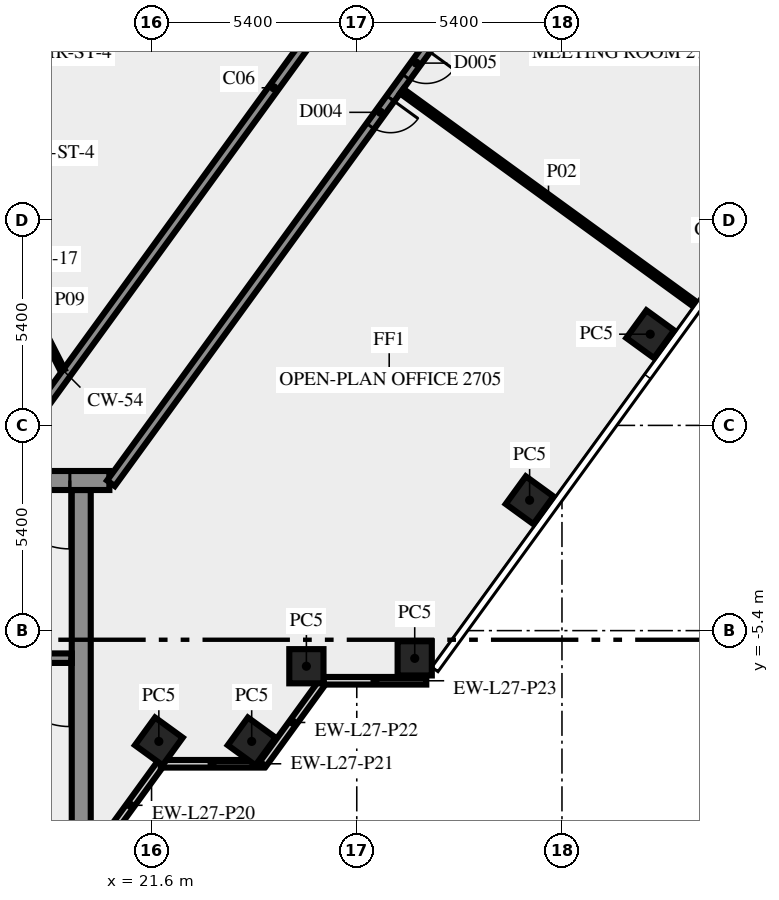
"""IFC4 building model, lengths in metres.
Left out: names, types, materials, properties, quantities, classifications, styles, units other than length and angle.
Written with IfcOpenShell. Run it as: python <this file> out.ifc"""

import sys

from ifc_helpers import new_model, si_unit, direction, frame, frame_2d, origin, origin_2d, place, context, subcontext, project, spatial, rectangle, extrude, element, fill, save


model = new_model("IFC4")
c1 = context("Model", 3, precision=1e-05, world=origin(), true_north=direction((0.0, 1.0)))
c2 = subcontext(c1, "Body", "Model", "MODEL_VIEW")
j1 = project(units=[si_unit("LENGTHUNIT", "METRE"), si_unit("PLANEANGLEUNIT", "RADIAN")], contexts=[c1])
p1 = place(None, origin())
s1 = spatial("IfcSite", under=j1, at=p1, CompositionType="ELEMENT")
p2 = place(p1, origin())
s2 = spatial("IfcBuilding", under=s1, at=p2, CompositionType="ELEMENT")
p3 = place(p2, frame((0.0, 0.0, 117.0)))
s3 = spatial("IfcBuildingStorey", under=s2, at=p3, CompositionType="ELEMENT", Elevation=117.0)
for number, where, z_axis, x_axis in (
    (1, (21.792, -8.315, 0.0), (0.0, 0.0, 1.0), (0.588, 0.809, 0.0)),
    (2, (24.235, -8.315, 0.0), (0.0, 0.0, 1.0), (0.588, 0.809, 0.0)),
    (3, (25.674, -6.337, 0.0), (0.0, 0.0, 1.0), (1.0, 0.0, 0.0)),
    (4, (28.525, -6.13, 0.0), (0.0, 0.0, 1.0), (1.0, 0.0, 0.0)),
    (5, (31.548, -1.969, 0.0), (0.0, 0.0, 1.0), (0.588, 0.809, 0.0)),
    (6, (34.722, 2.4, 0.0), (0.0, 0.0, 1.0), (0.588, 0.809, 0.0)),
):
    element("IfcColumn", number, at=place(p3, frame(where, z_axis=z_axis, x_axis=x_axis)), inside=s3, PredefinedType="COLUMN", context=c2, shape_type="SweptSolid", body=[
        extrude(rectangle(XDim=0.9, YDim=0.9, at=origin_2d()), origin(), (0.0, 0.0, 1.0), 3.65),
    ])
p4 = place(p3, frame((20.253, -11.083, 0.0), z_axis=(0.0, 0.0, 1.0), x_axis=(0.587766567315, 0.809030569476, 0.0)))
e7 = element("IfcWall", 7, at=p4, inside=s3, PredefinedType="SOLIDWALL", context=c2, shape_type="SweptSolid", body=[
    extrude(rectangle(XDim=2.688, YDim=0.2, at=frame_2d((1.344, 0.0))), origin(), (0.0, 0.0, 1.0), 3.65),
])
p5 = place(p3, frame((21.843, -8.904, 0.0), z_axis=(0.0, 0.0, 1.0), x_axis=(1.0, 0.0, 0.0)))
e8 = element("IfcWall", 8, at=p5, inside=s3, PredefinedType="SOLIDWALL", context=c2, shape_type="SweptSolid", body=[
    extrude(rectangle(XDim=2.7, YDim=0.2, at=frame_2d((1.35, 0.0))), origin(), (0.0, 0.0, 1.0), 3.65),
])
p6 = place(p3, frame((24.533, -8.909, 0.0), z_axis=(0.0, 0.0, 1.0), x_axis=(0.587720002413, 0.809064397168, 0.0)))
e9 = element("IfcWall", 9, at=p6, inside=s3, PredefinedType="SOLIDWALL", context=c2, shape_type="SweptSolid", body=[
    extrude(rectangle(XDim=2.7, YDim=0.2, at=frame_2d((1.35, 0.0))), origin(), (0.0, 0.0, 1.0), 3.65),
])
p7 = place(p3, frame((26.13, -6.719, 0.0), z_axis=(0.0, 0.0, 1.0), x_axis=(1.0, 0.0, 0.0)))
e10 = element("IfcWall", 10, at=p7, inside=s3, PredefinedType="SOLIDWALL", context=c2, shape_type="SweptSolid", body=[
    extrude(rectangle(XDim=2.7, YDim=0.2, at=frame_2d((1.35, 0.0))), origin(), (0.0, 0.0, 1.0), 3.65),
])
p8 = place(p3, frame((19.75, -10.5, 0.0), z_axis=(0.0, 0.0, 1.0), x_axis=(0.0, 1.0, 0.0)))
e11 = element("IfcWall", 11, at=p8, inside=s3, PredefinedType="SHEAR", context=c2, shape_type="SweptSolid", body=[
    extrude(rectangle(XDim=8.8, YDim=0.5, at=frame_2d((4.4, 0.0))), origin(), (0.0, 0.0, 1.0), 3.65),
])
p9 = place(p3, frame((19.5, -6.125, 0.0), z_axis=(0.0, 0.0, 1.0), x_axis=(-1.0, 0.0, 0.0)))
e12 = element("IfcWall", 12, at=p9, inside=s3, PredefinedType="SHEAR", context=c2, shape_type="SweptSolid", body=[
    extrude(rectangle(XDim=8.05, YDim=0.25, at=frame_2d((4.025, 0.0))), origin(), (0.0, 0.0, 1.0), 3.65),
])
p10 = place(p9, frame((0.05, 0.0, 0.0)))
e13 = element("IfcOpeningElement", 13, at=p10, cuts=e12, PredefinedType="OPENING", context=c2, shape_type="SweptSolid", body=[
    extrude(rectangle(XDim=1.8, YDim=2.1, at=frame_2d((0.9, 1.05))), frame((0.0, 0.135, 0.0), z_axis=(0.0, -1.0, 0.0), x_axis=(1.0, 0.0, 0.0)), (0.0, 0.0, 1.0), 0.27),
])
p11 = place(p3, frame((20.49, -1.45, 0.0), z_axis=(0.0, 0.0, 1.0), x_axis=(-1.0, 0.0, 0.0)))
e14 = element("IfcWall", 14, at=p11, inside=s3, PredefinedType="SHEAR", context=c2, shape_type="SweptSolid", body=[
    extrude(rectangle(XDim=40.98, YDim=0.5, at=frame_2d((20.49, 0.0))), origin(), (0.0, 0.0, 1.0), 3.65),
])
p12 = place(p11, frame((38.14, 0.0, 0.0)))
e15 = element("IfcOpeningElement", 15, at=p12, cuts=e14, PredefinedType="OPENING", context=c2, shape_type="SweptSolid", body=[
    extrude(rectangle(XDim=1.8, YDim=2.1, at=frame_2d((0.9, 1.05))), frame((0.0, 0.26, 0.0), z_axis=(0.0, -1.0, 0.0), x_axis=(1.0, 0.0, 0.0)), (0.0, 0.0, 1.0), 0.52),
])
p13 = place(p11, frame((36.728, 0.0, 0.0)))
e16 = element("IfcOpeningElement", 16, at=p13, cuts=e14, PredefinedType="OPENING", context=c2, shape_type="SweptSolid", body=[
    extrude(rectangle(XDim=0.8, YDim=2.1, at=frame_2d((0.4, 1.05))), frame((0.0, 0.26, 0.0), z_axis=(0.0, -1.0, 0.0), x_axis=(1.0, 0.0, 0.0)), (0.0, 0.0, 1.0), 0.52),
])
p14 = place(p11, frame((35.153, 0.0, 0.0)))
e17 = element("IfcOpeningElement", 17, at=p14, cuts=e14, PredefinedType="OPENING", context=c2, shape_type="SweptSolid", body=[
    extrude(rectangle(XDim=0.8, YDim=2.1, at=frame_2d((0.4, 1.05))), frame((0.0, 0.26, 0.0), z_axis=(0.0, -1.0, 0.0), x_axis=(1.0, 0.0, 0.0)), (0.0, 0.0, 1.0), 0.52),
])
p15 = place(p11, frame((32.94, 0.0, 0.0)))
e18 = element("IfcOpeningElement", 18, at=p15, cuts=e14, PredefinedType="OPENING", context=c2, shape_type="SweptSolid", body=[
    extrude(rectangle(XDim=0.9, YDim=2.1, at=frame_2d((0.45, 1.05))), frame((0.0, 0.26, 0.0), z_axis=(0.0, -1.0, 0.0), x_axis=(1.0, 0.0, 0.0)), (0.0, 0.0, 1.0), 0.52),
])
p16 = place(p11, frame((21.765, 0.0, 0.0)))
e19 = element("IfcOpeningElement", 19, at=p16, cuts=e14, PredefinedType="OPENING", context=c2, shape_type="SweptSolid", body=[
    extrude(rectangle(XDim=2.0, YDim=2.1, at=frame_2d((1.0, 1.05))), frame((0.0, 0.26, 0.0), z_axis=(0.0, -1.0, 0.0), x_axis=(1.0, 0.0, 0.0)), (0.0, 0.0, 1.0), 0.52),
])
p17 = place(p11, frame((7.14, 0.0, 0.0)))
e20 = element("IfcOpeningElement", 20, at=p17, cuts=e14, PredefinedType="OPENING", context=c2, shape_type="SweptSolid", body=[
    extrude(rectangle(XDim=0.9, YDim=2.1, at=frame_2d((0.45, 1.05))), frame((0.0, 0.26, 0.0), z_axis=(0.0, -1.0, 0.0), x_axis=(1.0, 0.0, 0.0)), (0.0, 0.0, 1.0), 0.52),
])
p18 = place(p11, frame((4.19, 0.0, 0.0)))
e21 = element("IfcOpeningElement", 21, at=p18, cuts=e14, PredefinedType="OPENING", context=c2, shape_type="SweptSolid", body=[
    extrude(rectangle(XDim=0.9, YDim=2.1, at=frame_2d((0.45, 1.05))), frame((0.0, 0.26, 0.0), z_axis=(0.0, -1.0, 0.0), x_axis=(1.0, 0.0, 0.0)), (0.0, 0.0, 1.0), 0.52),
])
p19 = place(p11, frame((1.04, 0.0, 0.0)))
e22 = element("IfcOpeningElement", 22, at=p19, cuts=e14, PredefinedType="OPENING", context=c2, shape_type="SweptSolid", body=[
    extrude(rectangle(XDim=1.8, YDim=2.1, at=frame_2d((0.9, 1.05))), frame((0.0, 0.26, 0.0), z_axis=(0.0, -1.0, 0.0), x_axis=(1.0, 0.0, 0.0)), (0.0, 0.0, 1.0), 0.52),
])
p20 = place(p3, frame((40.463, 25.911, 0.0), z_axis=(0.0, 0.0, 1.0), x_axis=(-0.587781654618, -0.809019608226, 0.0)))
e23 = element("IfcWall", 23, at=p20, inside=s3, PredefinedType="SOLIDWALL", context=c2, shape_type="SweptSolid", body=[
    extrude(rectangle(XDim=33.911, YDim=0.25, at=frame_2d((16.956, 0.0))), origin(), (0.0, 0.0, 1.0), 3.65),
])
p21 = place(p20, frame((21.396, 0.0, 0.0)))
e24 = element("IfcOpeningElement", 24, at=p21, cuts=e23, PredefinedType="OPENING", context=c2, shape_type="SweptSolid", body=[
    extrude(rectangle(XDim=0.9, YDim=2.1, at=frame_2d((0.45, 1.05))), frame((0.0, 0.135, 0.0), z_axis=(0.0, -1.0, 0.0), x_axis=(1.0, 0.0, 0.0)), (0.0, 0.0, 1.0), 0.27),
])
p22 = place(p20, frame((19.795, 0.0, 0.0)))
e25 = element("IfcOpeningElement", 25, at=p22, cuts=e23, PredefinedType="OPENING", context=c2, shape_type="SweptSolid", body=[
    extrude(rectangle(XDim=0.9, YDim=2.1, at=frame_2d((0.45, 1.05))), frame((0.0, 0.135, 0.0), z_axis=(0.0, -1.0, 0.0), x_axis=(1.0, 0.0, 0.0)), (0.0, 0.0, 1.0), 0.27),
])
p23 = place(p3, frame((17.545, -1.125, 0.0), z_axis=(0.0, 0.0, 1.0), x_axis=(0.587788021768, 0.809014982226, 0.0)))
e26 = element("IfcWall", 26, at=p23, inside=s3, PredefinedType="SOLIDWALL", context=c2, shape_type="SweptSolid", body=[
    extrude(rectangle(XDim=35.344, YDim=0.25, at=frame_2d((17.672, 0.0))), origin(), (0.0, 0.0, 1.0), 3.65),
])
p24 = place(p23, frame((17.508, 0.0, 0.0)))
e27 = element("IfcOpeningElement", 27, at=p24, cuts=e26, PredefinedType="OPENING", context=c2, shape_type="SweptSolid", body=[
    extrude(rectangle(XDim=0.9, YDim=2.1, at=frame_2d((0.45, 1.05))), frame((0.0, 0.135, 0.0), z_axis=(0.0, -1.0, 0.0), x_axis=(1.0, 0.0, 0.0)), (0.0, 0.0, 1.0), 0.27),
])
p25 = place(p23, frame((21.808, 0.0, 0.0)))
e28 = element("IfcOpeningElement", 28, at=p25, cuts=e26, PredefinedType="OPENING", context=c2, shape_type="SweptSolid", body=[
    extrude(rectangle(XDim=0.9, YDim=2.1, at=frame_2d((0.45, 1.05))), frame((0.0, 0.135, 0.0), z_axis=(0.0, -1.0, 0.0), x_axis=(1.0, 0.0, 0.0)), (0.0, 0.0, 1.0), 0.27),
])
p26 = place(p23, frame((19.108, 0.0, 0.0)))
e29 = element("IfcOpeningElement", 29, at=p26, cuts=e26, PredefinedType="OPENING", context=c2, shape_type="SweptSolid", body=[
    extrude(rectangle(XDim=0.9, YDim=2.1, at=frame_2d((0.45, 1.05))), frame((0.0, 0.135, 0.0), z_axis=(0.0, -1.0, 0.0), x_axis=(1.0, 0.0, 0.0)), (0.0, 0.0, 1.0), 0.27),
])
p27 = place(p3, frame((35.909, 3.183, 0.0), z_axis=(0.0, 0.0, 1.0), x_axis=(-0.809045492695, 0.587746025721, 0.0)))
e30 = element("IfcWall", 30, at=p27, inside=s3, PredefinedType="PARTITIONING", context=c2, shape_type="SweptSolid", body=[
    extrude(rectangle(XDim=9.551, YDim=0.15, at=frame_2d((4.775, 0.0))), origin(), (0.0, 0.0, 1.0), 2.75),
])
p28 = place(p3, frame((18.0, 3.925, 0.0), z_axis=(0.0, 0.0, 1.0), x_axis=(0.453950796792, -0.891026752736, 0.0)))
e31 = element("IfcWall", 31, at=p28, inside=s3, PredefinedType="PARTITIONING", context=c2, shape_type="SweptSolid", body=[
    extrude(rectangle(XDim=2.778, YDim=0.12, at=frame_2d((1.389, 0.0))), origin(), (0.0, 0.0, 1.0), 3.65),
])
p29 = place(p10, origin())
e32 = element("IfcDoor", 32, at=p29, inside=s3, OperationType="DOUBLE_DOOR_SINGLE_SWING", PredefinedType="DOOR", context=c2, shape_type="SweptSolid", body=[
    extrude(rectangle(XDim=1.8, YDim=2.1, at=frame_2d((0.9, 1.05))), frame((0.0, 0.025, 0.0), z_axis=(0.0, -1.0, 0.0), x_axis=(1.0, 0.0, 0.0)), (0.0, 0.0, 1.0), 0.05),
])
fill(e13, e32)
p30 = place(p19, origin())
e33 = element("IfcDoor", 33, at=p30, inside=s3, OperationType="DOUBLE_DOOR_SINGLE_SWING", PredefinedType="DOOR", context=c2, shape_type="SweptSolid", body=[
    extrude(rectangle(XDim=1.8, YDim=2.1, at=frame_2d((0.9, 1.05))), frame((0.0, 0.025, 0.0), z_axis=(0.0, -1.0, 0.0), x_axis=(1.0, 0.0, 0.0)), (0.0, 0.0, 1.0), 0.05),
])
fill(e22, e33)
p31 = place(p21, origin())
e34 = element("IfcDoor", 34, at=p31, inside=s3, OperationType="SINGLE_SWING_LEFT", PredefinedType="DOOR", context=c2, shape_type="SweptSolid", body=[
    extrude(rectangle(XDim=0.9, YDim=2.1, at=frame_2d((0.45, 1.05))), frame((0.0, 0.025, 0.0), z_axis=(0.0, -1.0, 0.0), x_axis=(1.0, 0.0, 0.0)), (0.0, 0.0, 1.0), 0.05),
])
fill(e24, e34)
p32 = place(p22, origin())
e35 = element("IfcDoor", 35, at=p32, inside=s3, OperationType="SINGLE_SWING_RIGHT", PredefinedType="DOOR", context=c2, shape_type="SweptSolid", body=[
    extrude(rectangle(XDim=0.9, YDim=2.1, at=frame_2d((0.45, 1.05))), frame((0.0, 0.025, 0.0), z_axis=(0.0, -1.0, 0.0), x_axis=(1.0, 0.0, 0.0)), (0.0, 0.0, 1.0), 0.05),
])
fill(e25, e35)
save(model, sys.argv[1])
